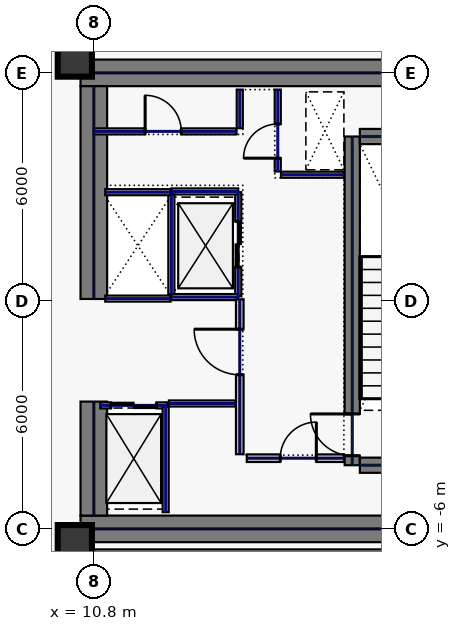
"""IFC4 building model, lengths in metres.
Left out: names, types, materials, properties, quantities, classifications, styles, units other than length and angle.
Written with IfcOpenShell. Run it as: python <this file> out.ifc"""

import sys

from ifc_helpers import new_model, si_unit, direction, frame, frame_2d, origin, origin_2d, place, context, subcontext, project, spatial, rectangle, hollow_rectangle, extrude, element, fill, save


model = new_model("IFC4")
c1 = context("Model", 3, precision=1e-05, world=origin(), true_north=direction((0.0, 1.0)))
c2 = subcontext(c1, "Body", "Model", "MODEL_VIEW")
j1 = project(units=[si_unit("LENGTHUNIT", "METRE"), si_unit("PLANEANGLEUNIT", "RADIAN")], contexts=[c1])
p1 = place(None, origin())
s1 = spatial("IfcSite", under=j1, at=p1, CompositionType="ELEMENT")
p2 = place(p1, origin())
s2 = spatial("IfcBuilding", under=s1, at=p2, CompositionType="ELEMENT")
p3 = place(p2, frame((0.0, 0.0, 192.2)))
s3 = spatial("IfcBuildingStorey", under=s2, at=p3, CompositionType="ELEMENT", Elevation=192.2)
for number, where, z_axis, x_axis in (
    (1, (10.45, 6.0, 0.0), (0.0, 0.0, 1.0), (1.0, 0.0, 0.0)),
    (2, (10.45, -6.0, 0.0), (0.0, 0.0, 1.0), (1.0, 0.0, 0.0)),
):
    element("IfcWall", number, at=place(p3, frame(where, z_axis=z_axis, x_axis=x_axis)), inside=s3, PredefinedType="SHEAR", context=c2, shape_type="SweptSolid", body=[
        extrude(rectangle(XDim=11.55, YDim=0.7, at=frame_2d((5.775, 0.0))), origin(), (0.0, 0.0, 1.0), 3.74),
    ])
p4 = place(p3, frame((10.8, -5.65, 0.0), z_axis=(0.0, 0.0, 1.0), x_axis=(0.0, 1.0, 0.0)))
e3 = element("IfcWall", 3, at=p4, inside=s3, PredefinedType="SHEAR", context=c2, shape_type="SweptSolid", body=[
    extrude(rectangle(XDim=3.0, YDim=0.7, at=frame_2d((1.5, 0.0))), origin(), (0.0, 0.0, 1.0), 3.74),
])
p5 = place(p3, frame((10.8, 0.05, 0.0), z_axis=(0.0, 0.0, 1.0), x_axis=(0.0, 1.0, 0.0)))
e4 = element("IfcWall", 4, at=p5, inside=s3, PredefinedType="SHEAR", context=c2, shape_type="SweptSolid", body=[
    extrude(rectangle(XDim=5.6, YDim=0.7, at=frame_2d((2.8, 0.0))), origin(), (0.0, 0.0, 1.0), 3.74),
])
p6 = place(p3, frame((17.6, -4.325, 0.0), z_axis=(0.0, 0.0, 1.0), x_axis=(0.0, 1.0, 0.0)))
e5 = element("IfcWall", 5, at=p6, inside=s3, PredefinedType="SHEAR", context=c2, shape_type="SweptSolid", body=[
    extrude(rectangle(XDim=8.65, YDim=0.4, at=frame_2d((4.325, 0.0))), origin(), (0.0, 0.0, 1.0), 3.74),
])
p7 = place(p6, frame((0.25, 0.0, 0.0)))
e6 = element("IfcOpeningElement", 6, at=p7, cuts=e5, PredefinedType="OPENING", context=c2, shape_type="SweptSolid", body=[
    extrude(rectangle(XDim=1.1, YDim=2.2, at=frame_2d((0.55, 1.1))), frame((0.0, 0.21, 0.0), z_axis=(0.0, -1.0, 0.0), x_axis=(1.0, 0.0, 0.0)), (0.0, 0.0, 1.0), 0.42),
])
for number, where, z_axis, x_axis in (
    (7, (17.8, -4.325, 0.0), (0.0, 0.0, 1.0), (1.0, 0.0, 0.0)),
    (8, (17.8, 4.325, 0.0), (0.0, 0.0, 1.0), (1.0, 0.0, 0.0)),
):
    element("IfcWall", number, at=place(p3, frame(where, z_axis=z_axis, x_axis=x_axis)), inside=s3, PredefinedType="SHEAR", context=c2, shape_type="SweptSolid", body=[
        extrude(rectangle(XDim=3.4, YDim=0.4, at=frame_2d((1.7, 0.0))), origin(), (0.0, 0.0, 1.0), 3.74),
    ])
for number, where, z_axis, x_axis in (
    (9, (10.3, -6.35, 0.0), (0.0, 0.0, 1.0), (1.0, 0.0, 0.0)),
    (10, (10.3, 6.35, 0.0), (0.0, 0.0, 1.0), (1.0, 0.0, 0.0)),
):
    element("IfcColumn", number, at=place(p3, frame(where, z_axis=z_axis, x_axis=x_axis)), inside=s3, PredefinedType="COLUMN", context=c2, shape_type="SweptSolid", body=[
        extrude(hollow_rectangle(XDim=0.9, YDim=0.9, WallThickness=0.04, at=origin_2d()), origin(), (0.0, 0.0, 1.0), 3.74),
    ])
p8 = place(p3, frame((14.6, 0.12, 0.0), z_axis=(0.0, 0.0, 1.0), x_axis=(0.0, 1.0, 0.0)))
e11 = element("IfcWall", 11, at=p8, inside=s3, PredefinedType="PARTITIONING", context=c2, shape_type="SweptSolid", body=[
    extrude(rectangle(XDim=2.74, YDim=0.16, at=frame_2d((1.37, 0.0))), origin(), (0.0, 0.0, 1.0), 3.74),
])
p9 = place(p8, frame((0.77, 0.0, 0.0)))
e12 = element("IfcOpeningElement", 12, at=p9, cuts=e11, PredefinedType="OPENING", context=c2, shape_type="SweptSolid", body=[
    extrude(rectangle(XDim=1.2, YDim=2.2, at=frame_2d((0.6, 1.1))), frame((0.0, 0.09, 0.0), z_axis=(0.0, -1.0, 0.0), x_axis=(1.0, 0.0, 0.0)), (0.0, 0.0, 1.0), 0.18),
])
for number, where, z_axis, x_axis in (
    (13, (12.84, 0.1, 0.0), (0.0, 0.0, 1.0), (1.0, 0.0, 0.0)),
    (14, (12.84, 2.88, 0.0), (0.0, 0.0, 1.0), (1.0, 0.0, 0.0)),
):
    element("IfcWall", number, at=place(p3, frame(where, z_axis=z_axis, x_axis=x_axis)), inside=s3, PredefinedType="PARTITIONING", context=c2, shape_type="SweptSolid", body=[
        extrude(rectangle(XDim=1.76, YDim=0.16, at=frame_2d((0.88, 0.0))), origin(), (0.0, 0.0, 1.0), 3.74),
    ])
p10 = place(p3, frame((12.84, 0.18, 0.0), z_axis=(0.0, 0.0, 1.0), x_axis=(0.0, 1.0, 0.0)))
e15 = element("IfcWall", 15, at=p10, inside=s3, PredefinedType="PARTITIONING", context=c2, shape_type="SweptSolid", body=[
    extrude(rectangle(XDim=2.62, YDim=0.16, at=frame_2d((1.31, 0.0))), origin(), (0.0, 0.0, 1.0), 3.74),
])
p11 = place(p3, frame((10.97, -2.75, 0.0), z_axis=(0.0, 0.0, 1.0), x_axis=(1.0, 0.0, 0.0)))
e16 = element("IfcWall", 16, at=p11, inside=s3, PredefinedType="PARTITIONING", context=c2, shape_type="SweptSolid", body=[
    extrude(rectangle(XDim=1.76, YDim=0.16, at=frame_2d((0.88, 0.0))), origin(), (0.0, 0.0, 1.0), 3.74),
])
p12 = place(p11, frame((0.28, 0.0, 0.0)))
e17 = element("IfcOpeningElement", 17, at=p12, cuts=e16, PredefinedType="OPENING", context=c2, shape_type="SweptSolid", body=[
    extrude(rectangle(XDim=1.2, YDim=2.2, at=frame_2d((0.6, 1.1))), frame((0.0, 0.09, 0.0), z_axis=(0.0, -1.0, 0.0), x_axis=(1.0, 0.0, 0.0)), (0.0, 0.0, 1.0), 0.18),
])
for number, where, z_axis, x_axis in (
    (18, (11.1, 0.06, 0.0), (0.0, 0.0, 1.0), (1.0, 0.0, 0.0)),
    (19, (11.1, 2.86, 0.0), (0.0, 0.0, 1.0), (1.0, 0.0, 0.0)),
):
    element("IfcWall", number, at=place(p3, frame(where, z_axis=z_axis, x_axis=x_axis)), inside=s3, PredefinedType="PARTITIONING", context=c2, shape_type="SweptSolid", body=[
        extrude(rectangle(XDim=1.72, YDim=0.16, at=frame_2d((0.86, 0.0))), origin(), (0.0, 0.0, 1.0), 3.74),
    ])
p13 = place(p3, frame((15.64, 3.405, 0.0), z_axis=(0.0, 0.0, 1.0), x_axis=(0.0, 1.0, 0.0)))
e20 = element("IfcWall", 20, at=p13, inside=s3, PredefinedType="PARTITIONING", context=c2, shape_type="SweptSolid", body=[
    extrude(rectangle(XDim=2.155, YDim=0.16, at=frame_2d((1.078, 0.0))), origin(), (0.0, 0.0, 1.0), 3.74),
])
p14 = place(p13, frame((0.35, 0.0, 0.0)))
e21 = element("IfcOpeningElement", 21, at=p14, cuts=e20, PredefinedType="OPENING", context=c2, shape_type="SweptSolid", body=[
    extrude(rectangle(XDim=0.9, YDim=2.2, at=frame_2d((0.45, 1.1))), frame((0.0, 0.09, 0.0), z_axis=(0.0, -1.0, 0.0), x_axis=(1.0, 0.0, 0.0)), (0.0, 0.0, 1.0), 0.18),
])
p15 = place(p3, frame((15.725, 3.32, 0.0), z_axis=(0.0, 0.0, 1.0), x_axis=(1.0, 0.0, 0.0)))
e22 = element("IfcWall", 22, at=p15, inside=s3, PredefinedType="PARTITIONING", context=c2, shape_type="SweptSolid", body=[
    extrude(rectangle(XDim=1.655, YDim=0.16, at=frame_2d((0.827, 0.0))), origin(), (0.0, 0.0, 1.0), 3.74),
])
p16 = place(p3, frame((14.825, -4.14, 0.0), z_axis=(0.0, 0.0, 1.0), x_axis=(1.0, 0.0, 0.0)))
e23 = element("IfcWall", 23, at=p16, inside=s3, PredefinedType="SOLIDWALL", context=c2, shape_type="SweptSolid", body=[
    extrude(rectangle(XDim=2.555, YDim=0.2, at=frame_2d((1.277, 0.0))), origin(), (0.0, 0.0, 1.0), 3.74),
])
p17 = place(p16, frame((0.88, 0.0, 0.0)))
e24 = element("IfcOpeningElement", 24, at=p17, cuts=e23, PredefinedType="OPENING", context=c2, shape_type="SweptSolid", body=[
    extrude(rectangle(XDim=0.95, YDim=2.2, at=frame_2d((0.475, 1.1))), frame((0.0, 0.11, 0.0), z_axis=(0.0, -1.0, 0.0), x_axis=(1.0, 0.0, 0.0)), (0.0, 0.0, 1.0), 0.22),
])
p18 = place(p3, frame((12.775, -2.7, 0.0), z_axis=(0.0, 0.0, 1.0), x_axis=(1.0, 0.0, 0.0)))
e25 = element("IfcWall", 25, at=p18, inside=s3, PredefinedType="PARTITIONING", context=c2, shape_type="SweptSolid", body=[
    extrude(rectangle(XDim=1.76, YDim=0.16, at=frame_2d((0.88, 0.0))), origin(), (0.0, 0.0, 1.0), 3.74),
])
p19 = place(p3, frame((12.69, -5.56, 0.0), z_axis=(0.0, 0.0, 1.0), x_axis=(0.0, 1.0, 0.0)))
e26 = element("IfcWall", 26, at=p19, inside=s3, PredefinedType="PARTITIONING", context=c2, shape_type="SweptSolid", body=[
    extrude(rectangle(XDim=2.775, YDim=0.16, at=frame_2d((1.388, 0.0))), origin(), (0.0, 0.0, 1.0), 3.74),
])
p20 = place(p3, frame((10.8, 4.46, 0.0), z_axis=(0.0, 0.0, 1.0), x_axis=(1.0, 0.0, 0.0)))
e27 = element("IfcWall", 27, at=p20, inside=s3, PredefinedType="PARTITIONING", context=c2, shape_type="SweptSolid", body=[
    extrude(rectangle(XDim=3.755, YDim=0.16, at=frame_2d((1.877, 0.0))), origin(), (0.0, 0.0, 1.0), 3.74),
])
p21 = place(p20, frame((1.35, 0.0, 0.0)))
e28 = element("IfcOpeningElement", 28, at=p21, cuts=e27, PredefinedType="OPENING", context=c2, shape_type="SweptSolid", body=[
    extrude(rectangle(XDim=0.95, YDim=2.2, at=frame_2d((0.475, 1.1))), frame((0.0, 0.09, 0.0), z_axis=(0.0, -1.0, 0.0), x_axis=(1.0, 0.0, 0.0)), (0.0, 0.0, 1.0), 0.18),
])
p22 = place(p3, frame((14.64, 4.545, 0.0), z_axis=(0.0, 0.0, 1.0), x_axis=(0.0, 1.0, 0.0)))
e29 = element("IfcWall", 29, at=p22, inside=s3, PredefinedType="PARTITIONING", context=c2, shape_type="SweptSolid", body=[
    extrude(rectangle(XDim=1.015, YDim=0.16, at=frame_2d((0.508, 0.0))), origin(), (0.0, 0.0, 1.0), 3.74),
])
p23 = place(p3, frame((14.64, -4.035, 0.0), z_axis=(0.0, 0.0, 1.0), x_axis=(0.0, 1.0, 0.0)))
e30 = element("IfcWall", 30, at=p23, inside=s3, PredefinedType="SOLIDWALL", context=c2, shape_type="SweptSolid", body=[
    extrude(rectangle(XDim=4.075, YDim=0.2, at=frame_2d((2.038, 0.0))), origin(), (0.0, 0.0, 1.0), 3.74),
])
p24 = place(p23, frame((2.09, 0.0, 0.0)))
e31 = element("IfcOpeningElement", 31, at=p24, cuts=e30, PredefinedType="OPENING", context=c2, shape_type="SweptSolid", body=[
    extrude(rectangle(XDim=1.2, YDim=2.2, at=frame_2d((0.6, 1.1))), frame((0.0, 0.11, 0.0), z_axis=(0.0, -1.0, 0.0), x_axis=(1.0, 0.0, 0.0)), (0.0, 0.0, 1.0), 0.22),
])
p25 = place(p3, frame((10.63, -6.62, 0.0), z_axis=(0.0, 0.0, 1.0), x_axis=(1.0, 0.0, 0.0)))
e32 = element("IfcWall", 32, at=p25, inside=s3, PredefinedType="PARTITIONING", context=c2, shape_type="SweptSolid", body=[
    extrude(rectangle(XDim=14.335, YDim=0.16, at=frame_2d((7.167, 0.0))), origin(), (0.0, 0.0, 1.0), 3.74),
])
p26 = place(p7, origin())
e33 = element("IfcDoor", 33, at=p26, inside=s3, OperationType="SINGLE_SWING_RIGHT", PredefinedType="DOOR", context=c2, shape_type="SweptSolid", body=[
    extrude(rectangle(XDim=1.1, YDim=2.2, at=frame_2d((0.55, 1.1))), frame((0.0, 0.025, 0.0), z_axis=(0.0, -1.0, 0.0), x_axis=(1.0, 0.0, 0.0)), (0.0, 0.0, 1.0), 0.05),
])
fill(e6, e33)
p27 = place(p9, origin())
e34 = element("IfcDoor", 34, at=p27, inside=s3, OperationType="SLIDING_TO_LEFT", PredefinedType="DOOR", context=c2, shape_type="SweptSolid", body=[
    extrude(rectangle(XDim=1.2, YDim=2.2, at=frame_2d((0.6, 1.1))), frame((0.0, 0.025, 0.0), z_axis=(0.0, -1.0, 0.0), x_axis=(1.0, 0.0, 0.0)), (0.0, 0.0, 1.0), 0.05),
])
fill(e12, e34)
p28 = place(p12, origin())
e35 = element("IfcDoor", 35, at=p28, inside=s3, OperationType="SLIDING_TO_LEFT", PredefinedType="DOOR", context=c2, shape_type="SweptSolid", body=[
    extrude(rectangle(XDim=1.2, YDim=2.2, at=frame_2d((0.6, 1.1))), frame((0.0, 0.025, 0.0), z_axis=(0.0, -1.0, 0.0), x_axis=(1.0, 0.0, 0.0)), (0.0, 0.0, 1.0), 0.05),
])
fill(e17, e35)
p29 = place(p14, origin())
e36 = element("IfcDoor", 36, at=p29, inside=s3, OperationType="SINGLE_SWING_LEFT", PredefinedType="DOOR", context=c2, shape_type="SweptSolid", body=[
    extrude(rectangle(XDim=0.9, YDim=2.2, at=frame_2d((0.45, 1.1))), frame((0.0, 0.025, 0.0), z_axis=(0.0, -1.0, 0.0), x_axis=(1.0, 0.0, 0.0)), (0.0, 0.0, 1.0), 0.05),
])
fill(e21, e36)
p30 = place(p17, origin())
e37 = element("IfcDoor", 37, at=p30, inside=s3, OperationType="SINGLE_SWING_RIGHT", PredefinedType="DOOR", context=c2, shape_type="SweptSolid", body=[
    extrude(rectangle(XDim=0.95, YDim=2.2, at=frame_2d((0.475, 1.1))), frame((0.0, 0.025, 0.0), z_axis=(0.0, -1.0, 0.0), x_axis=(1.0, 0.0, 0.0)), (0.0, 0.0, 1.0), 0.05),
])
fill(e24, e37)
p31 = place(p21, origin())
e38 = element("IfcDoor", 38, at=p31, inside=s3, OperationType="SINGLE_SWING_LEFT", PredefinedType="DOOR", context=c2, shape_type="SweptSolid", body=[
    extrude(rectangle(XDim=0.95, YDim=2.2, at=frame_2d((0.475, 1.1))), frame((0.0, 0.025, 0.0), z_axis=(0.0, -1.0, 0.0), x_axis=(1.0, 0.0, 0.0)), (0.0, 0.0, 1.0), 0.05),
])
fill(e28, e38)
p32 = place(p24, origin())
e39 = element("IfcDoor", 39, at=p32, inside=s3, OperationType="SINGLE_SWING_RIGHT", PredefinedType="DOOR", context=c2, shape_type="SweptSolid", body=[
    extrude(rectangle(XDim=1.2, YDim=2.2, at=frame_2d((0.6, 1.1))), frame((0.0, 0.025, 0.0), z_axis=(0.0, -1.0, 0.0), x_axis=(1.0, 0.0, 0.0)), (0.0, 0.0, 1.0), 0.05),
])
fill(e31, e39)
save(model, sys.argv[1])
